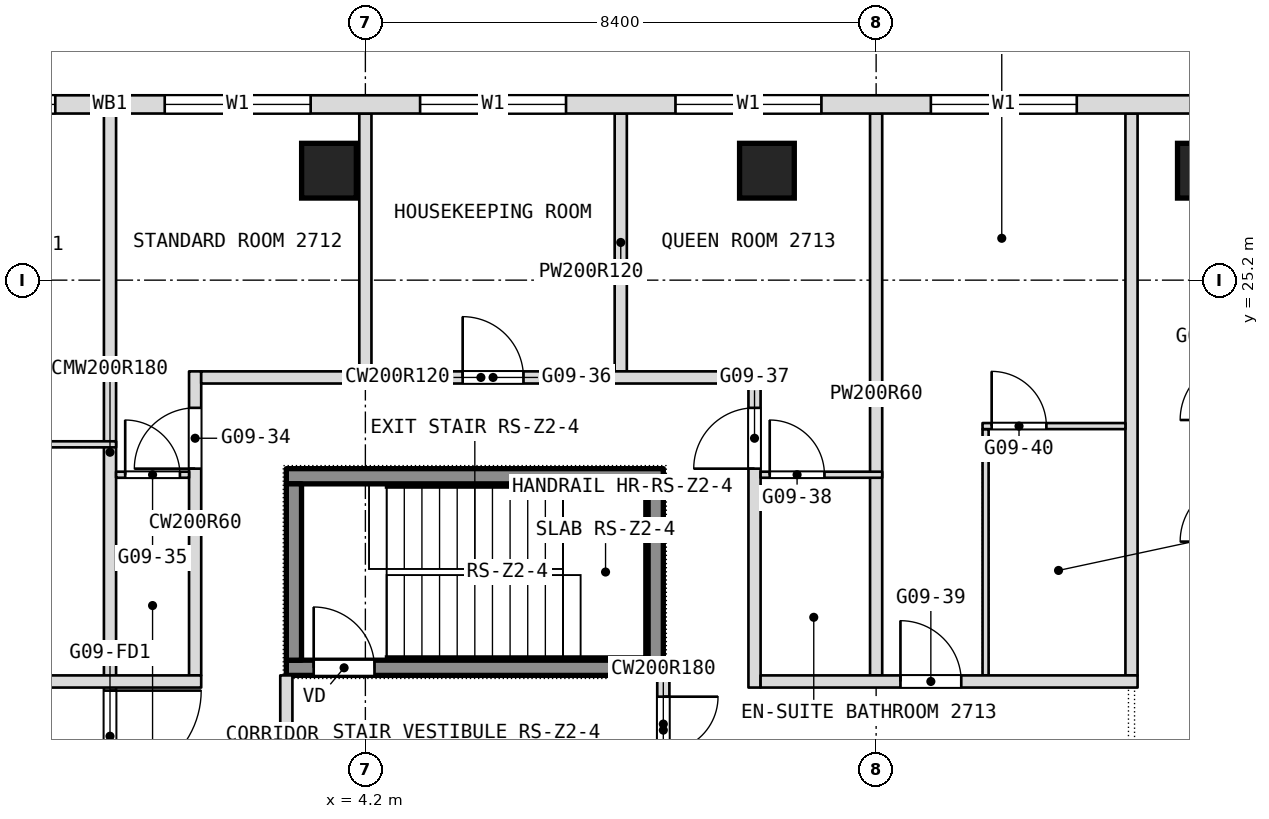
"""IFC4 building model, lengths in metres.
Left out: names, types, materials, properties, quantities, classifications, styles, units other than length and angle.
Written with IfcOpenShell. Run it as: python <this file> out.ifc"""

import sys

from ifc_helpers import new_model, si_unit, direction, frame, frame_2d, origin, origin_2d, place, context, subcontext, project, spatial, rectangle, extrude, element, fill, save


model = new_model("IFC4")
c1 = context("Model", 3, precision=1e-05, world=origin(), true_north=direction((0.0, 1.0)))
c2 = subcontext(c1, "Body", "Model", "MODEL_VIEW")
j1 = project(units=[si_unit("LENGTHUNIT", "METRE"), si_unit("PLANEANGLEUNIT", "RADIAN")], contexts=[c1])
p1 = place(None, origin())
s1 = spatial("IfcSite", under=j1, at=p1, CompositionType="ELEMENT")
p2 = place(p1, origin())
s2 = spatial("IfcBuilding", under=s1, at=p2, CompositionType="ELEMENT")
p3 = place(p2, frame((0.0, 0.0, 122.9)))
s3 = spatial("IfcBuildingStorey", under=s2, at=p3, CompositionType="ELEMENT", Elevation=122.9)
for number, where, z_axis, x_axis in (
    (1, (3.601, 27.0, 0.0), (0.0, 0.0, 1.0), (1.0, 0.0, 0.0)),
    (2, (10.804, 27.0, 0.0), (0.0, 0.0, 1.0), (1.0, 0.0, 0.0)),
    (3, (18.007, 27.0, 0.0), (0.0, 0.0, 1.0), (1.0, 0.0, 0.0)),
):
    element("IfcColumn", number, at=place(p3, frame(where, z_axis=z_axis, x_axis=x_axis)), inside=s3, PredefinedType="COLUMN", context=c2, shape_type="SweptSolid", body=[
        extrude(rectangle(XDim=0.9, YDim=0.9, at=origin_2d()), origin(), (0.0, 0.0, 1.0), 3.6),
    ])
p4 = place(p3, frame((16.8, 18.7, 0.0), z_axis=(0.0, 0.0, 1.0), x_axis=(0.0, 1.0, 0.0)))
e4 = element("IfcWall", 4, at=p4, inside=s3, PredefinedType="PARTITIONING", context=c2, shape_type="SweptSolid", body=[
    extrude(rectangle(XDim=9.24, YDim=0.2, at=frame_2d((4.62, 0.0))), origin(), (0.0, 0.0, 1.0), 3.34),
])
p5 = place(p3, frame((14.4, 18.7, 0.0), z_axis=(0.0, 0.0, 1.0), x_axis=(0.0, 1.0, 0.0)))
e5 = element("IfcWall", 5, at=p5, inside=s3, PredefinedType="PARTITIONING", context=c2, shape_type="SweptSolid", body=[
    extrude(rectangle(XDim=4.05, YDim=0.1, at=frame_2d((2.025, 0.0))), origin(), (0.0, 0.0, 1.0), 3.34),
])
p6 = place(p3, frame((12.6, 18.7, 0.0), z_axis=(0.0, 0.0, 1.0), x_axis=(0.0, 1.0, 0.0)))
e6 = element("IfcWall", 6, at=p6, inside=s3, PredefinedType="PARTITIONING", context=c2, shape_type="SweptSolid", body=[
    extrude(rectangle(XDim=9.24, YDim=0.2, at=frame_2d((4.62, 0.0))), origin(), (0.0, 0.0, 1.0), 3.34),
])
p7 = place(p3, frame((10.6, 18.5, 0.0), z_axis=(0.0, 0.0, 1.0), x_axis=(0.0, 1.0, 0.0)))
e7 = element("IfcWall", 7, at=p7, inside=s3, PredefinedType="PARTITIONING", context=c2, shape_type="SweptSolid", body=[
    extrude(rectangle(XDim=5.0, YDim=0.2, at=frame_2d((2.5, 0.0))), origin(), (0.0, 0.0, 1.0), 3.34),
])
p8 = place(p7, frame((3.6, 0.0, 0.0)))
e8 = element("IfcOpeningElement", 8, at=p8, cuts=e7, PredefinedType="OPENING", context=c2, shape_type="SweptSolid", body=[
    extrude(rectangle(XDim=1.0, YDim=2.1, at=frame_2d((0.5, 1.05))), frame((0.0, 0.1, 0.0), z_axis=(0.0, -1.0, 0.0), x_axis=(1.0, 0.0, 0.0)), (0.0, 0.0, 1.0), 0.2),
])
p9 = place(p3, frame((9.1, 16.9, 0.0), z_axis=(0.0, 0.0, 1.0), x_axis=(0.0, 1.0, 0.0)))
e9 = element("IfcWall", 9, at=p9, inside=s3, PredefinedType="PARTITIONING", context=c2, shape_type="SweptSolid", body=[
    extrude(rectangle(XDim=1.8, YDim=0.2, at=frame_2d((0.9, 0.0))), origin(), (0.0, 0.0, 1.0), 3.34),
])
p10 = place(p9, frame((0.55, 0.0, 0.0)))
e10 = element("IfcOpeningElement", 10, at=p10, cuts=e9, PredefinedType="OPENING", context=c2, shape_type="SweptSolid", body=[
    extrude(rectangle(XDim=0.9, YDim=2.1, at=frame_2d((0.45, 1.05))), frame((0.0, 0.1, 0.0), z_axis=(0.0, -1.0, 0.0), x_axis=(1.0, 0.0, 0.0)), (0.0, 0.0, 1.0), 0.2),
])
for number, where, z_axis, x_axis in (
    (11, (8.4, 23.7, 0.0), (0.0, 0.0, 1.0), (0.0, 1.0, 0.0)),
    (12, (4.2, 23.7, 0.0), (0.0, 0.0, 1.0), (0.0, 1.0, 0.0)),
):
    element("IfcWall", number, at=place(p3, frame(where, z_axis=z_axis, x_axis=x_axis)), inside=s3, PredefinedType="PARTITIONING", context=c2, shape_type="SweptSolid", body=[
        extrude(rectangle(XDim=4.24, YDim=0.2, at=frame_2d((2.12, 0.0))), origin(), (0.0, 0.0, 1.0), 3.34),
    ])
p11 = place(p3, frame((2.9, 16.9, 0.0), z_axis=(0.0, 0.0, 1.0), x_axis=(0.0, 1.0, 0.0)))
e13 = element("IfcWall", 13, at=p11, inside=s3, PredefinedType="PARTITIONING", context=c2, shape_type="SweptSolid", body=[
    extrude(rectangle(XDim=1.8, YDim=0.2, at=frame_2d((0.9, 0.0))), origin(), (0.0, 0.0, 1.0), 3.34),
])
p12 = place(p3, frame((1.4, 18.7, 0.0), z_axis=(0.0, 0.0, 1.0), x_axis=(0.0, 1.0, 0.0)))
e14 = element("IfcWall", 14, at=p12, inside=s3, PredefinedType="PARTITIONING", context=c2, shape_type="SweptSolid", body=[
    extrude(rectangle(XDim=5.0, YDim=0.2, at=frame_2d((2.5, 0.0))), origin(), (0.0, 0.0, 1.0), 3.34),
])
p13 = place(p12, frame((3.4, 0.0, 0.0)))
e15 = element("IfcOpeningElement", 15, at=p13, cuts=e14, PredefinedType="OPENING", context=c2, shape_type="SweptSolid", body=[
    extrude(rectangle(XDim=1.0, YDim=2.1, at=frame_2d((0.5, 1.05))), frame((0.0, 0.1, 0.0), z_axis=(0.0, -1.0, 0.0), x_axis=(1.0, 0.0, 0.0)), (0.0, 0.0, 1.0), 0.2),
])
p14 = place(p3, frame((0.0, 16.8, 0.0), z_axis=(0.0, 0.0, 1.0), x_axis=(0.0, 1.0, 0.0)))
e16 = element("IfcWall", 16, at=p14, inside=s3, PredefinedType="PARTITIONING", context=c2, shape_type="SweptSolid", body=[
    extrude(rectangle(XDim=11.14, YDim=0.2, at=frame_2d((5.57, 0.0))), origin(), (0.0, 0.0, 1.0), 3.34),
])
p15 = place(p14, frame((0.15, 0.0, 0.0)))
e17 = element("IfcOpeningElement", 17, at=p15, cuts=e16, PredefinedType="OPENING", context=c2, shape_type="SweptSolid", body=[
    extrude(rectangle(XDim=1.5, YDim=2.1, at=frame_2d((0.75, 1.05))), frame((0.0, 0.1, 0.0), z_axis=(0.0, -1.0, 0.0), x_axis=(1.0, 0.0, 0.0)), (0.0, 0.0, 1.0), 0.2),
])
p16 = place(p3, frame((-16.9, 18.6, 0.0), z_axis=(0.0, 0.0, 1.0), x_axis=(1.0, 0.0, 0.0)))
e18 = element("IfcWall", 18, at=p16, inside=s3, PredefinedType="PARTITIONING", context=c2, shape_type="SweptSolid", body=[
    extrude(rectangle(XDim=18.4, YDim=0.2, at=frame_2d((9.2, 0.0))), origin(), (0.0, 0.0, 1.0), 3.34),
])
p17 = place(p16, frame((0.5, 0.0, 0.0)))
e19 = element("IfcOpeningElement", 19, at=p17, cuts=e18, PredefinedType="OPENING", context=c2, shape_type="SweptSolid", body=[
    extrude(rectangle(XDim=1.0, YDim=2.1, at=frame_2d((0.5, 1.05))), frame((0.0, 0.1, 0.0), z_axis=(0.0, -1.0, 0.0), x_axis=(1.0, 0.0, 0.0)), (0.0, 0.0, 1.0), 0.2),
])
p18 = place(p16, frame((7.1, 0.0, 0.0)))
e20 = element("IfcOpeningElement", 20, at=p18, cuts=e18, PredefinedType="OPENING", context=c2, shape_type="SweptSolid", body=[
    extrude(rectangle(XDim=1.0, YDim=2.1, at=frame_2d((0.5, 1.05))), frame((0.0, 0.1, 0.0), z_axis=(0.0, -1.0, 0.0), x_axis=(1.0, 0.0, 0.0)), (0.0, 0.0, 1.0), 0.2),
])
p19 = place(p16, frame((8.9, 0.0, 0.0)))
e21 = element("IfcOpeningElement", 21, at=p19, cuts=e18, PredefinedType="OPENING", context=c2, shape_type="SweptSolid", body=[
    extrude(rectangle(XDim=1.0, YDim=2.1, at=frame_2d((0.5, 1.05))), frame((0.0, 0.1, 0.0), z_axis=(0.0, -1.0, 0.0), x_axis=(1.0, 0.0, 0.0)), (0.0, 0.0, 1.0), 0.2),
])
p20 = place(p16, frame((13.1, 0.0, 0.0)))
e22 = element("IfcOpeningElement", 22, at=p20, cuts=e18, PredefinedType="OPENING", context=c2, shape_type="SweptSolid", body=[
    extrude(rectangle(XDim=1.0, YDim=2.1, at=frame_2d((0.5, 1.05))), frame((0.0, 0.1, 0.0), z_axis=(0.0, -1.0, 0.0), x_axis=(1.0, 0.0, 0.0)), (0.0, 0.0, 1.0), 0.2),
])
p21 = place(p3, frame((10.7, 18.6, 0.0), z_axis=(0.0, 0.0, 1.0), x_axis=(1.0, 0.0, 0.0)))
e23 = element("IfcWall", 23, at=p21, inside=s3, PredefinedType="PARTITIONING", context=c2, shape_type="SweptSolid", body=[
    extrude(rectangle(XDim=6.2, YDim=0.2, at=frame_2d((3.1, 0.0))), origin(), (0.0, 0.0, 1.0), 3.34),
])
p22 = place(p21, frame((2.3, 0.0, 0.0)))
e24 = element("IfcOpeningElement", 24, at=p22, cuts=e23, PredefinedType="OPENING", context=c2, shape_type="SweptSolid", body=[
    extrude(rectangle(XDim=1.0, YDim=2.1, at=frame_2d((0.5, 1.05))), frame((0.0, 0.1, 0.0), z_axis=(0.0, -1.0, 0.0), x_axis=(1.0, 0.0, 0.0)), (0.0, 0.0, 1.0), 0.2),
])
p23 = place(p3, frame((0.1, 22.0, 0.0), z_axis=(0.0, 0.0, 1.0), x_axis=(1.0, 0.0, 0.0)))
e25 = element("IfcWall", 25, at=p23, inside=s3, PredefinedType="PARTITIONING", context=c2, shape_type="SweptSolid", body=[
    extrude(rectangle(XDim=1.2, YDim=0.1, at=frame_2d((0.6, 0.0))), origin(), (0.0, 0.0, 1.0), 3.34),
])
p24 = place(p23, frame((0.15, 0.0, 0.0)))
e26 = element("IfcOpeningElement", 26, at=p24, cuts=e25, PredefinedType="OPENING", context=c2, shape_type="SweptSolid", body=[
    extrude(rectangle(XDim=0.9, YDim=2.1, at=frame_2d((0.45, 1.05))), frame((0.0, 0.05, 0.0), z_axis=(0.0, -1.0, 0.0), x_axis=(1.0, 0.0, 0.0)), (0.0, 0.0, 1.0), 0.1),
])
p25 = place(p3, frame((10.7, 22.0, 0.0), z_axis=(0.0, 0.0, 1.0), x_axis=(1.0, 0.0, 0.0)))
e27 = element("IfcWall", 27, at=p25, inside=s3, PredefinedType="PARTITIONING", context=c2, shape_type="SweptSolid", body=[
    extrude(rectangle(XDim=2.0, YDim=0.1, at=frame_2d((1.0, 0.0))), origin(), (0.0, 0.0, 1.0), 3.34),
])
p26 = place(p25, frame((0.15, 0.0, 0.0)))
e28 = element("IfcOpeningElement", 28, at=p26, cuts=e27, PredefinedType="OPENING", context=c2, shape_type="SweptSolid", body=[
    extrude(rectangle(XDim=0.9, YDim=2.1, at=frame_2d((0.45, 1.05))), frame((0.0, 0.05, 0.0), z_axis=(0.0, -1.0, 0.0), x_axis=(1.0, 0.0, 0.0)), (0.0, 0.0, 1.0), 0.1),
])
p27 = place(p3, frame((-2.45, 22.5, 0.0), z_axis=(0.0, 0.0, 1.0), x_axis=(1.0, 0.0, 0.0)))
e29 = element("IfcWall", 29, at=p27, inside=s3, PredefinedType="PARTITIONING", context=c2, shape_type="SweptSolid", body=[
    extrude(rectangle(XDim=2.55, YDim=0.1, at=frame_2d((1.275, 0.0))), origin(), (0.0, 0.0, 1.0), 3.34),
])
p28 = place(p27, frame((0.15, 0.0, 0.0)))
e30 = element("IfcOpeningElement", 30, at=p28, cuts=e29, PredefinedType="OPENING", context=c2, shape_type="SweptSolid", body=[
    extrude(rectangle(XDim=0.9, YDim=2.1, at=frame_2d((0.45, 1.05))), frame((0.0, 0.05, 0.0), z_axis=(0.0, -1.0, 0.0), x_axis=(1.0, 0.0, 0.0)), (0.0, 0.0, 1.0), 0.1),
])
p29 = place(p3, frame((14.35, 22.8, 0.0), z_axis=(0.0, 0.0, 1.0), x_axis=(1.0, 0.0, 0.0)))
e31 = element("IfcWall", 31, at=p29, inside=s3, PredefinedType="PARTITIONING", context=c2, shape_type="SweptSolid", body=[
    extrude(rectangle(XDim=2.35, YDim=0.1, at=frame_2d((1.175, 0.0))), origin(), (0.0, 0.0, 1.0), 3.34),
])
p30 = place(p29, frame((0.15, 0.0, 0.0)))
e32 = element("IfcOpeningElement", 32, at=p30, cuts=e31, PredefinedType="OPENING", context=c2, shape_type="SweptSolid", body=[
    extrude(rectangle(XDim=0.9, YDim=2.1, at=frame_2d((0.45, 1.05))), frame((0.0, 0.05, 0.0), z_axis=(0.0, -1.0, 0.0), x_axis=(1.0, 0.0, 0.0)), (0.0, 0.0, 1.0), 0.1),
])
p31 = place(p3, frame((1.5, 23.6, 0.0), z_axis=(0.0, 0.0, 1.0), x_axis=(1.0, 0.0, 0.0)))
e33 = element("IfcWall", 33, at=p31, inside=s3, PredefinedType="PARTITIONING", context=c2, shape_type="SweptSolid", body=[
    extrude(rectangle(XDim=9.2, YDim=0.2, at=frame_2d((4.6, 0.0))), origin(), (0.0, 0.0, 1.0), 3.34),
])
p32 = place(p31, frame((4.3, 0.0, 0.0)))
e34 = element("IfcOpeningElement", 34, at=p32, cuts=e33, PredefinedType="OPENING", context=c2, shape_type="SweptSolid", body=[
    extrude(rectangle(XDim=1.0, YDim=2.1, at=frame_2d((0.5, 1.05))), frame((0.0, 0.1, 0.0), z_axis=(0.0, -1.0, 0.0), x_axis=(1.0, 0.0, 0.0)), (0.0, 0.0, 1.0), 0.2),
])
p33 = place(p3, frame((21.306, 28.09, 0.0), z_axis=(0.0, 0.0, 1.0), x_axis=(-1.0, 0.0, 0.0)))
e35 = element("IfcWall", 35, at=p33, inside=s3, PredefinedType="NOTDEFINED", context=c2, shape_type="SweptSolid", body=[
    extrude(rectangle(XDim=42.612, YDim=0.3, at=frame_2d((21.306, 0.0))), origin(), (0.0, 0.0, 1.0), 3.6),
])
p34 = place(p33, frame((5.406, 0.0, 0.9)))
e36 = element("IfcOpeningElement", 36, at=p34, cuts=e35, PredefinedType="OPENING", context=c2, shape_type="SweptSolid", body=[
    extrude(rectangle(XDim=2.4, YDim=2.1, at=frame_2d((1.2, 1.05))), frame((0.0, 0.15, 0.0), z_axis=(0.0, -1.0, 0.0), x_axis=(1.0, 0.0, 0.0)), (0.0, 0.0, 1.0), 0.3),
])
p35 = place(p33, frame((9.606, 0.0, 0.9)))
e37 = element("IfcOpeningElement", 37, at=p35, cuts=e35, PredefinedType="OPENING", context=c2, shape_type="SweptSolid", body=[
    extrude(rectangle(XDim=2.4, YDim=2.1, at=frame_2d((1.2, 1.05))), frame((0.0, 0.15, 0.0), z_axis=(0.0, -1.0, 0.0), x_axis=(1.0, 0.0, 0.0)), (0.0, 0.0, 1.0), 0.3),
])
p36 = place(p33, frame((13.806, 0.0, 0.9)))
e38 = element("IfcOpeningElement", 38, at=p36, cuts=e35, PredefinedType="OPENING", context=c2, shape_type="SweptSolid", body=[
    extrude(rectangle(XDim=2.4, YDim=2.1, at=frame_2d((1.2, 1.05))), frame((0.0, 0.15, 0.0), z_axis=(0.0, -1.0, 0.0), x_axis=(1.0, 0.0, 0.0)), (0.0, 0.0, 1.0), 0.3),
])
p37 = place(p33, frame((18.006, 0.0, 0.9)))
e39 = element("IfcOpeningElement", 39, at=p37, cuts=e35, PredefinedType="OPENING", context=c2, shape_type="SweptSolid", body=[
    extrude(rectangle(XDim=2.4, YDim=2.1, at=frame_2d((1.2, 1.05))), frame((0.0, 0.15, 0.0), z_axis=(0.0, -1.0, 0.0), x_axis=(1.0, 0.0, 0.0)), (0.0, 0.0, 1.0), 0.3),
])
p38 = place(p33, frame((22.206, 0.0, 0.9)))
e40 = element("IfcOpeningElement", 40, at=p38, cuts=e35, PredefinedType="OPENING", context=c2, shape_type="SweptSolid", body=[
    extrude(rectangle(XDim=2.4, YDim=2.1, at=frame_2d((1.2, 1.05))), frame((0.0, 0.15, 0.0), z_axis=(0.0, -1.0, 0.0), x_axis=(1.0, 0.0, 0.0)), (0.0, 0.0, 1.0), 0.3),
])
p39 = place(p33, frame((26.406, 0.0, 0.9)))
e41 = element("IfcOpeningElement", 41, at=p39, cuts=e35, PredefinedType="OPENING", context=c2, shape_type="SweptSolid", body=[
    extrude(rectangle(XDim=2.4, YDim=2.1, at=frame_2d((1.2, 1.05))), frame((0.0, 0.15, 0.0), z_axis=(0.0, -1.0, 0.0), x_axis=(1.0, 0.0, 0.0)), (0.0, 0.0, 1.0), 0.3),
])
p40 = place(p33, frame((30.606, 0.0, 0.9)))
e42 = element("IfcOpeningElement", 42, at=p40, cuts=e35, PredefinedType="OPENING", context=c2, shape_type="SweptSolid", body=[
    extrude(rectangle(XDim=2.4, YDim=2.1, at=frame_2d((1.2, 1.05))), frame((0.0, 0.15, 0.0), z_axis=(0.0, -1.0, 0.0), x_axis=(1.0, 0.0, 0.0)), (0.0, 0.0, 1.0), 0.3),
])
p41 = place(p33, frame((34.806, 0.0, 0.9)))
e43 = element("IfcOpeningElement", 43, at=p41, cuts=e35, PredefinedType="OPENING", context=c2, shape_type="SweptSolid", body=[
    extrude(rectangle(XDim=2.4, YDim=2.1, at=frame_2d((1.2, 1.05))), frame((0.0, 0.15, 0.0), z_axis=(0.0, -1.0, 0.0), x_axis=(1.0, 0.0, 0.0)), (0.0, 0.0, 1.0), 0.3),
])
p42 = place(p3, frame((2.9, 18.825, 0.1), z_axis=(0.0, 0.0, 1.0), x_axis=(1.0, 0.0, 0.0)))
e44 = element("IfcWall", 44, at=p42, inside=s3, PredefinedType="SHEAR", context=c2, shape_type="SweptSolid", body=[
    extrude(rectangle(XDim=6.2, YDim=0.25, at=frame_2d((3.1, 0.0))), origin(), (0.0, 0.0, 1.0), 3.6),
])
p43 = place(p42, frame((0.45, 0.0, 0.0)))
e45 = element("IfcOpeningElement", 45, at=p43, cuts=e44, PredefinedType="OPENING", context=c2, shape_type="SweptSolid", body=[
    extrude(rectangle(XDim=1.0, YDim=2.1, at=frame_2d((0.5, 1.05))), frame((0.0, 0.125, 0.0), z_axis=(0.0, -1.0, 0.0), x_axis=(1.0, 0.0, 0.0)), (0.0, 0.0, 1.0), 0.25),
])
p44 = place(p3, frame((2.9, 21.975, 0.1), z_axis=(0.0, 0.0, 1.0), x_axis=(1.0, 0.0, 0.0)))
e46 = element("IfcWall", 46, at=p44, inside=s3, PredefinedType="SHEAR", context=c2, shape_type="SweptSolid", body=[
    extrude(rectangle(XDim=6.2, YDim=0.25, at=frame_2d((3.1, 0.0))), origin(), (0.0, 0.0, 1.0), 3.6),
])
for number, where, z_axis, x_axis in (
    (47, (3.025, 18.95, 0.1), (0.0, 0.0, 1.0), (0.0, 1.0, 0.0)),
    (48, (8.975, 18.95, 0.1), (0.0, 0.0, 1.0), (0.0, 1.0, 0.0)),
):
    element("IfcWall", number, at=place(p3, frame(where, z_axis=z_axis, x_axis=x_axis)), inside=s3, PredefinedType="SHEAR", context=c2, shape_type="SweptSolid", body=[
        extrude(rectangle(XDim=2.9, YDim=0.25, at=frame_2d((1.45, 0.0))), origin(), (0.0, 0.0, 1.0), 3.6),
    ])
p45 = place(p8, origin())
e49 = element("IfcDoor", 49, at=p45, inside=s3, OperationType="SINGLE_SWING_LEFT", PredefinedType="DOOR", context=c2, shape_type="SweptSolid", body=[
    extrude(rectangle(XDim=1.0, YDim=2.1, at=frame_2d((0.5, 1.05))), frame((0.0, 0.025, 0.0), z_axis=(0.0, -1.0, 0.0), x_axis=(1.0, 0.0, 0.0)), (0.0, 0.0, 1.0), 0.05),
])
fill(e8, e49)
p46 = place(p10, origin())
e50 = element("IfcDoor", 50, at=p46, inside=s3, OperationType="SINGLE_SWING_RIGHT", PredefinedType="DOOR", context=c2, shape_type="SweptSolid", body=[
    extrude(rectangle(XDim=0.9, YDim=2.1, at=frame_2d((0.45, 1.05))), frame((0.0, 0.025, 0.0), z_axis=(0.0, -1.0, 0.0), x_axis=(1.0, 0.0, 0.0)), (0.0, 0.0, 1.0), 0.05),
])
fill(e10, e50)
p47 = place(p13, origin())
e51 = element("IfcDoor", 51, at=p47, inside=s3, OperationType="SINGLE_SWING_RIGHT", PredefinedType="DOOR", context=c2, shape_type="SweptSolid", body=[
    extrude(rectangle(XDim=1.0, YDim=2.1, at=frame_2d((0.5, 1.05))), frame((0.0, 0.025, 0.0), z_axis=(0.0, -1.0, 0.0), x_axis=(1.0, 0.0, 0.0)), (0.0, 0.0, 1.0), 0.05),
])
fill(e15, e51)
p48 = place(p22, origin())
e52 = element("IfcDoor", 52, at=p48, inside=s3, OperationType="SINGLE_SWING_RIGHT", PredefinedType="DOOR", context=c2, shape_type="SweptSolid", body=[
    extrude(rectangle(XDim=1.0, YDim=2.1, at=frame_2d((0.5, 1.05))), frame((0.0, 0.025, 0.0), z_axis=(0.0, -1.0, 0.0), x_axis=(1.0, 0.0, 0.0)), (0.0, 0.0, 1.0), 0.05),
])
fill(e24, e52)
p49 = place(p24, origin())
e53 = element("IfcDoor", 53, at=p49, inside=s3, OperationType="SINGLE_SWING_LEFT", PredefinedType="DOOR", context=c2, shape_type="SweptSolid", body=[
    extrude(rectangle(XDim=0.9, YDim=2.1, at=frame_2d((0.45, 1.05))), frame((0.0, 0.025, 0.0), z_axis=(0.0, -1.0, 0.0), x_axis=(1.0, 0.0, 0.0)), (0.0, 0.0, 1.0), 0.05),
])
fill(e26, e53)
p50 = place(p26, origin())
e54 = element("IfcDoor", 54, at=p50, inside=s3, OperationType="SINGLE_SWING_RIGHT", PredefinedType="DOOR", context=c2, shape_type="SweptSolid", body=[
    extrude(rectangle(XDim=0.9, YDim=2.1, at=frame_2d((0.45, 1.05))), frame((0.0, 0.025, 0.0), z_axis=(0.0, -1.0, 0.0), x_axis=(1.0, 0.0, 0.0)), (0.0, 0.0, 1.0), 0.05),
])
fill(e28, e54)
p51 = place(p30, origin())
e55 = element("IfcDoor", 55, at=p51, inside=s3, OperationType="SINGLE_SWING_RIGHT", PredefinedType="DOOR", context=c2, shape_type="SweptSolid", body=[
    extrude(rectangle(XDim=0.9, YDim=2.1, at=frame_2d((0.45, 1.05))), frame((0.0, 0.025, 0.0), z_axis=(0.0, -1.0, 0.0), x_axis=(1.0, 0.0, 0.0)), (0.0, 0.0, 1.0), 0.05),
])
fill(e32, e55)
p52 = place(p32, origin())
e56 = element("IfcDoor", 56, at=p52, inside=s3, OperationType="SINGLE_SWING_LEFT", PredefinedType="DOOR", context=c2, shape_type="SweptSolid", body=[
    extrude(rectangle(XDim=1.0, YDim=2.1, at=frame_2d((0.5, 1.05))), frame((0.0, 0.025, 0.0), z_axis=(0.0, -1.0, 0.0), x_axis=(1.0, 0.0, 0.0)), (0.0, 0.0, 1.0), 0.05),
])
fill(e34, e56)
p53 = place(p34, origin())
e57 = element("IfcWindow", 57, at=p53, inside=s3, PartitioningType="SINGLE_PANEL", PredefinedType="WINDOW", context=c2, shape_type="SweptSolid", body=[
    extrude(rectangle(XDim=2.4, YDim=2.1, at=frame_2d((1.2, 1.05))), frame((0.0, 0.03, 0.0), z_axis=(0.0, -1.0, 0.0), x_axis=(1.0, 0.0, 0.0)), (0.0, 0.0, 1.0), 0.06),
])
fill(e36, e57)
p54 = place(p35, origin())
e58 = element("IfcWindow", 58, at=p54, inside=s3, PartitioningType="SINGLE_PANEL", PredefinedType="WINDOW", context=c2, shape_type="SweptSolid", body=[
    extrude(rectangle(XDim=2.4, YDim=2.1, at=frame_2d((1.2, 1.05))), frame((0.0, 0.03, 0.0), z_axis=(0.0, -1.0, 0.0), x_axis=(1.0, 0.0, 0.0)), (0.0, 0.0, 1.0), 0.06),
])
fill(e37, e58)
p55 = place(p36, origin())
e59 = element("IfcWindow", 59, at=p55, inside=s3, PartitioningType="SINGLE_PANEL", PredefinedType="WINDOW", context=c2, shape_type="SweptSolid", body=[
    extrude(rectangle(XDim=2.4, YDim=2.1, at=frame_2d((1.2, 1.05))), frame((0.0, 0.03, 0.0), z_axis=(0.0, -1.0, 0.0), x_axis=(1.0, 0.0, 0.0)), (0.0, 0.0, 1.0), 0.06),
])
fill(e38, e59)
p56 = place(p37, origin())
e60 = element("IfcWindow", 60, at=p56, inside=s3, PartitioningType="SINGLE_PANEL", PredefinedType="WINDOW", context=c2, shape_type="SweptSolid", body=[
    extrude(rectangle(XDim=2.4, YDim=2.1, at=frame_2d((1.2, 1.05))), frame((0.0, 0.03, 0.0), z_axis=(0.0, -1.0, 0.0), x_axis=(1.0, 0.0, 0.0)), (0.0, 0.0, 1.0), 0.06),
])
fill(e39, e60)
p57 = place(p38, origin())
e61 = element("IfcWindow", 61, at=p57, inside=s3, PartitioningType="SINGLE_PANEL", PredefinedType="WINDOW", context=c2, shape_type="SweptSolid", body=[
    extrude(rectangle(XDim=2.4, YDim=2.1, at=frame_2d((1.2, 1.05))), frame((0.0, 0.03, 0.0), z_axis=(0.0, -1.0, 0.0), x_axis=(1.0, 0.0, 0.0)), (0.0, 0.0, 1.0), 0.06),
])
fill(e40, e61)
p58 = place(p43, origin())
e62 = element("IfcDoor", 62, at=p58, inside=s3, OperationType="SINGLE_SWING_LEFT", PredefinedType="DOOR", context=c2, shape_type="SweptSolid", body=[
    extrude(rectangle(XDim=1.0, YDim=2.1, at=frame_2d((0.5, 1.05))), frame((0.0, 0.025, 0.0), z_axis=(0.0, -1.0, 0.0), x_axis=(1.0, 0.0, 0.0)), (0.0, 0.0, 1.0), 0.05),
])
fill(e45, e62)
p59 = place(p15, origin())
e63 = element("IfcDoor", 63, at=p59, inside=s3, OperationType="DOUBLE_DOOR_DOUBLE_SWING", PredefinedType="DOOR", context=c2, shape_type="SweptSolid", body=[
    extrude(rectangle(XDim=1.5, YDim=2.1, at=frame_2d((0.75, 1.05))), frame((0.0, 0.025, 0.0), z_axis=(0.0, -1.0, 0.0), x_axis=(1.0, 0.0, 0.0)), (0.0, 0.0, 1.0), 0.05),
])
fill(e17, e63)
save(model, sys.argv[1])
